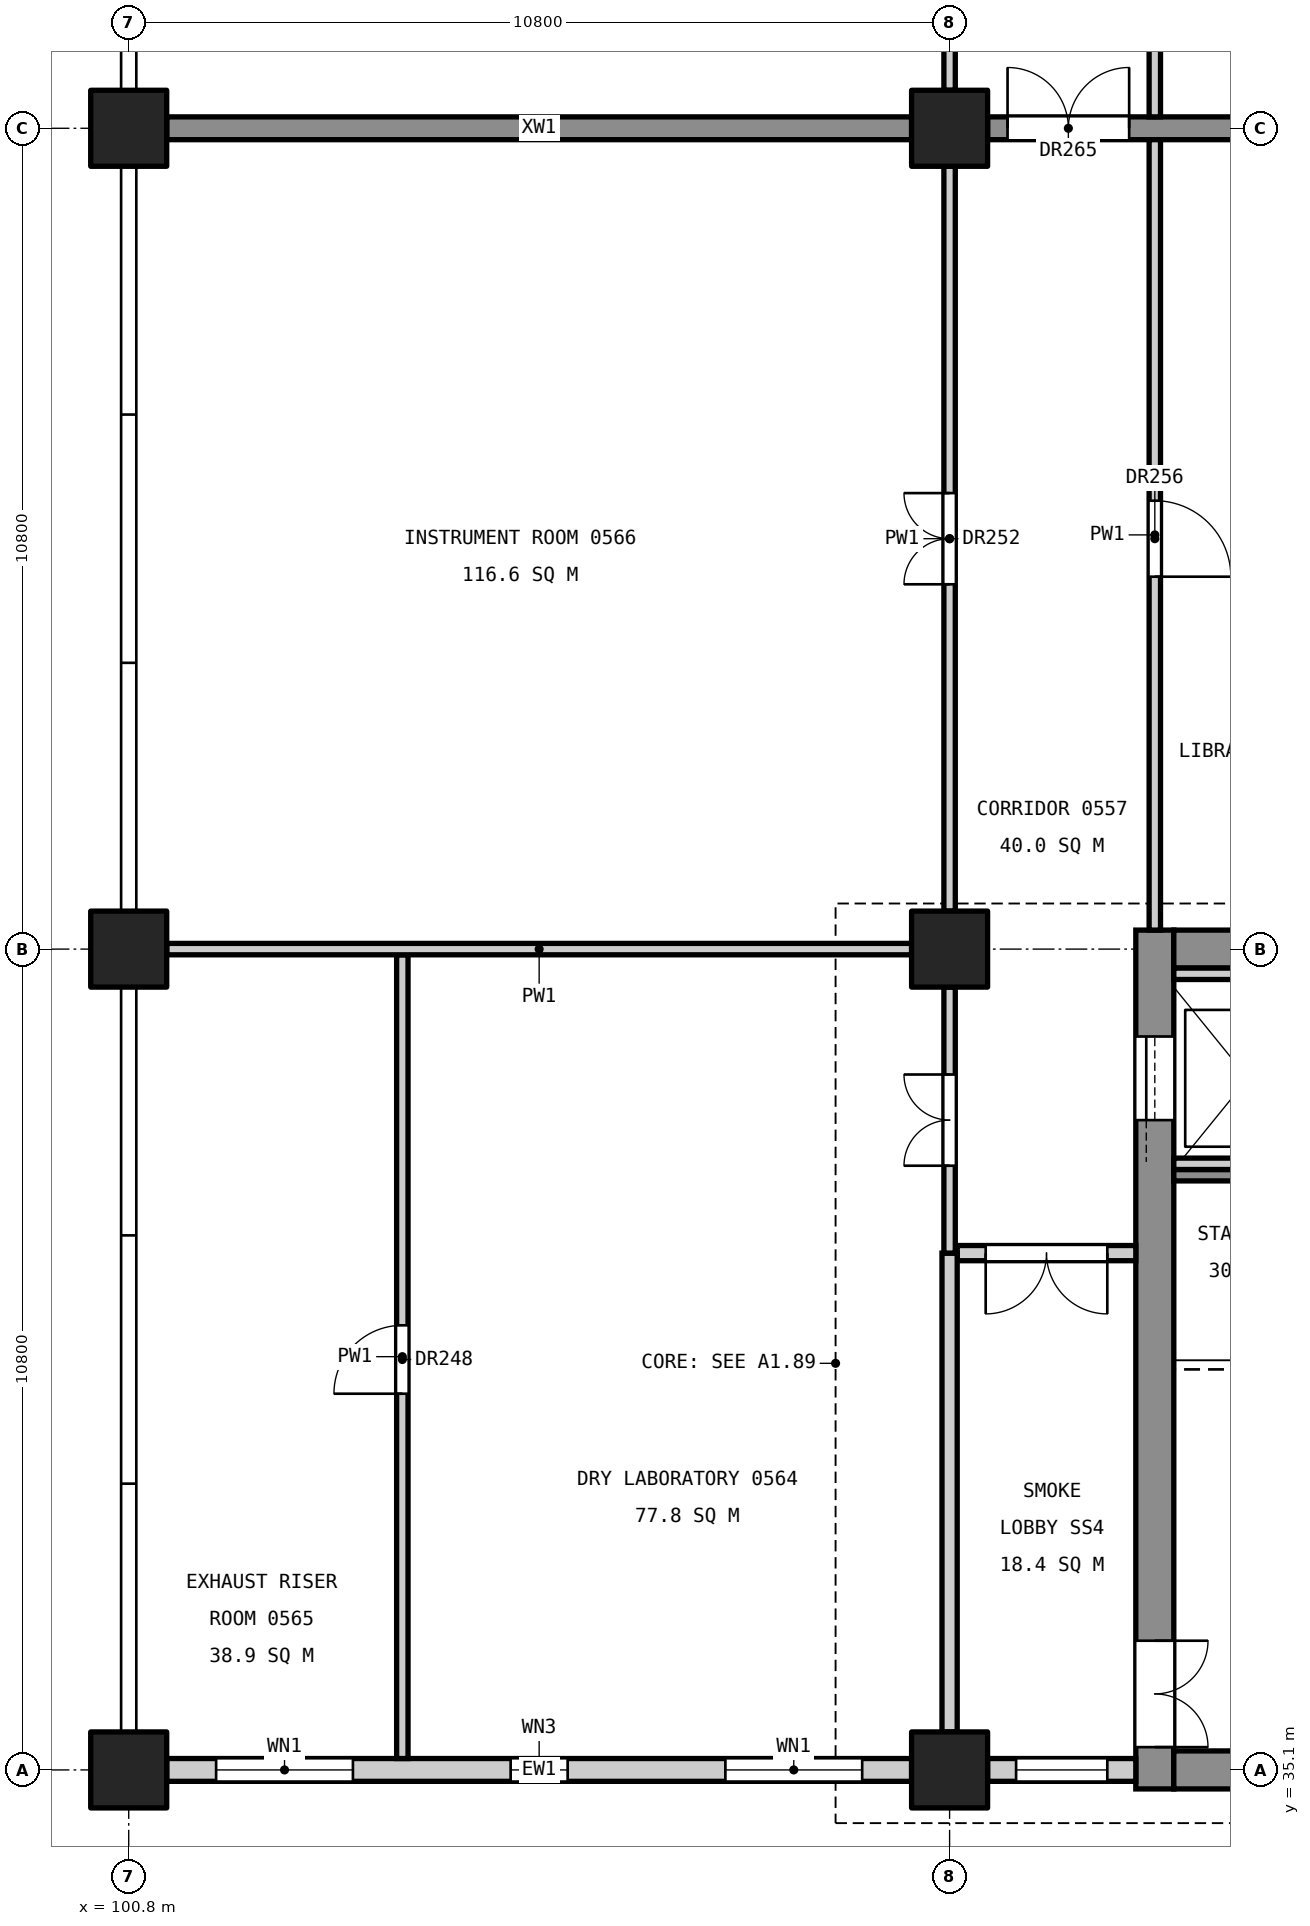
"""IFC4 building model, lengths in metres.
Left out: names, types, materials, properties, quantities, classifications, styles, units other than length and angle.
Written with IfcOpenShell. Run it as: python <this file> out.ifc"""

import sys

from ifc_helpers import new_model, si_unit, direction, frame, frame_2d, origin, origin_2d, place, context, subcontext, project, spatial, rectangle, extrude, element, fill, save


model = new_model("IFC4")
c1 = context("Model", 3, precision=1e-05, world=origin(), true_north=direction((0.0, 1.0)))
c2 = subcontext(c1, "Body", "Model", "MODEL_VIEW")
j1 = project(units=[si_unit("LENGTHUNIT", "METRE"), si_unit("PLANEANGLEUNIT", "RADIAN")], contexts=[c1])
p1 = place(None, origin())
s1 = spatial("IfcSite", under=j1, at=p1, CompositionType="ELEMENT")
p2 = place(p1, origin())
s2 = spatial("IfcBuilding", under=s1, at=p2, CompositionType="ELEMENT")
p3 = place(p2, frame((0.0, 0.0, 27.0)))
s3 = spatial("IfcBuildingStorey", under=s2, at=p3, CompositionType="ELEMENT", Elevation=27.0)
for number, where, z_axis, x_axis in (
    (1, (111.6, 35.1, 0.0), (0.0, 0.0, 1.0), (1.0, 0.0, 0.0)),
    (2, (111.6, 45.9, 0.0), (0.0, 0.0, 1.0), (1.0, 0.0, 0.0)),
    (3, (111.6, 56.7, 0.0), (0.0, 0.0, 1.0), (1.0, 0.0, 0.0)),
    (4, (100.8, 35.1, 0.0), (0.0, 0.0, 1.0), (1.0, 0.0, 0.0)),
    (5, (100.8, 45.9, 0.0), (0.0, 0.0, 1.0), (1.0, 0.0, 0.0)),
    (6, (100.8, 56.7, 0.0), (0.0, 0.0, 1.0), (1.0, 0.0, 0.0)),
):
    element("IfcColumn", number, at=place(p3, frame(where, z_axis=z_axis, x_axis=x_axis)), inside=s3, PredefinedType="COLUMN", context=c2, shape_type="SweptSolid", body=[
        extrude(rectangle(XDim=1.0, YDim=1.0, at=origin_2d()), origin(), (0.0, 0.0, 1.0), 4.8),
    ])
p4 = place(p3, frame((114.3, 34.85, 0.0), z_axis=(0.0, 0.0, 1.0), x_axis=(0.0, 1.0, 0.0)))
e7 = element("IfcWall", 7, at=p4, inside=s3, PredefinedType="SHEAR", context=c2, shape_type="SweptSolid", body=[
    extrude(rectangle(XDim=11.3, YDim=0.5, at=frame_2d((5.65, 0.0))), origin(), (0.0, 0.0, 1.0), 4.55),
])
p5 = place(p4, frame((0.55, 0.0, 0.0)))
e8 = element("IfcOpeningElement", 8, at=p5, cuts=e7, PredefinedType="OPENING", context=c2, shape_type="SweptSolid", body=[
    extrude(rectangle(XDim=1.4, YDim=2.1, at=frame_2d((0.7, 1.05))), frame((0.0, 0.26, 0.0), z_axis=(0.0, -1.0, 0.0), x_axis=(1.0, 0.0, 0.0)), (0.0, 0.0, 1.0), 0.52),
])
p6 = place(p4, frame((8.8, 0.0, 0.0)))
e9 = element("IfcOpeningElement", 9, at=p6, cuts=e7, PredefinedType="OPENING", context=c2, shape_type="SweptSolid", body=[
    extrude(rectangle(XDim=1.1, YDim=2.1, at=frame_2d((0.55, 1.05))), frame((0.0, 0.26, 0.0), z_axis=(0.0, -1.0, 0.0), x_axis=(1.0, 0.0, 0.0)), (0.0, 0.0, 1.0), 0.52),
])
p7 = place(p3, frame((118.55, 35.1, 0.0), z_axis=(0.0, 0.0, 1.0), x_axis=(-1.0, 0.0, 0.0)))
e10 = element("IfcWall", 10, at=p7, inside=s3, PredefinedType="SHEAR", context=c2, shape_type="SweptSolid", body=[
    extrude(rectangle(XDim=4.0, YDim=0.5, at=frame_2d((2.0, 0.0))), origin(), (0.0, 0.0, 1.0), 4.55),
])
p8 = place(p7, frame((1.4, 0.0, 3.4)))
e11 = element("IfcOpeningElement", 11, at=p8, cuts=e10, PredefinedType="OPENING", context=c2, shape_type="SweptSolid", body=[
    extrude(rectangle(XDim=1.2, YDim=0.9, at=frame_2d((0.6, 0.45))), frame((0.0, 0.26, 0.0), z_axis=(0.0, -1.0, 0.0), x_axis=(1.0, 0.0, 0.0)), (0.0, 0.0, 1.0), 0.52),
])
p9 = place(p3, frame((118.55, 45.9, 0.0), z_axis=(0.0, 0.0, 1.0), x_axis=(-1.0, 0.0, 0.0)))
e12 = element("IfcWall", 12, at=p9, inside=s3, PredefinedType="SHEAR", context=c2, shape_type="SweptSolid", body=[
    extrude(rectangle(XDim=4.0, YDim=0.5, at=frame_2d((2.0, 0.0))), origin(), (0.0, 0.0, 1.0), 4.55),
])
p10 = place(p3, frame((118.3, 56.7, 0.0), z_axis=(0.0, 0.0, 1.0), x_axis=(-1.0, 0.0, 0.0)))
e13 = element("IfcWall", 13, at=p10, inside=s3, PredefinedType="SHEAR", context=c2, shape_type="SweptSolid", body=[
    extrude(rectangle(XDim=6.2, YDim=0.3, at=frame_2d((3.1, 0.0))), origin(), (0.0, 0.0, 1.0), 4.55),
])
p11 = place(p10, frame((4.337, 0.0, 0.0)))
e14 = element("IfcOpeningElement", 14, at=p11, cuts=e13, PredefinedType="OPENING", context=c2, shape_type="SweptSolid", body=[
    extrude(rectangle(XDim=1.6, YDim=2.1, at=frame_2d((0.8, 1.05))), frame((0.0, 0.16, 0.0), z_axis=(0.0, -1.0, 0.0), x_axis=(1.0, 0.0, 0.0)), (0.0, 0.0, 1.0), 0.32),
])
p12 = place(p3, frame((111.1, 56.7, 0.0), z_axis=(0.0, 0.0, 1.0), x_axis=(-1.0, 0.0, 0.0)))
e15 = element("IfcWall", 15, at=p12, inside=s3, PredefinedType="SHEAR", context=c2, shape_type="SweptSolid", body=[
    extrude(rectangle(XDim=9.8, YDim=0.3, at=frame_2d((4.9, 0.0))), origin(), (0.0, 0.0, 1.0), 4.55),
])
p13 = place(p3, frame((118.55, 42.925, 0.0), z_axis=(0.0, 0.0, 1.0), x_axis=(-1.0, 0.0, 0.0)))
e16 = element("IfcWall", 16, at=p13, inside=s3, PredefinedType="SOLIDWALL", context=c2, shape_type="SweptSolid", body=[
    extrude(rectangle(XDim=4.0, YDim=0.15, at=frame_2d((2.0, 0.0))), origin(), (0.0, 0.0, 1.0), 4.55),
])
for number, where, z_axis, x_axis in (
    (17, (116.35, 43.075, 0.0), (0.0, 0.0, 1.0), (-1.0, 0.0, 0.0)),
    (18, (116.35, 45.575, 0.0), (0.0, 0.0, 1.0), (-1.0, 0.0, 0.0)),
):
    element("IfcWall", number, at=place(p3, frame(where, z_axis=z_axis, x_axis=x_axis)), inside=s3, PredefinedType="SOLIDWALL", context=c2, shape_type="SweptSolid", body=[
        extrude(rectangle(XDim=1.8, YDim=0.15, at=frame_2d((0.9, 0.0))), origin(), (0.0, 0.0, 1.0), 4.8),
    ])
p14 = place(p3, frame((114.05, 35.1, 0.0), z_axis=(0.0, 0.0, 1.0), x_axis=(-1.0, 0.0, 0.0)))
e19 = element("IfcWall", 19, at=p14, inside=s3, PredefinedType="STANDARD", context=c2, shape_type="SweptSolid", body=[
    extrude(rectangle(XDim=1.95, YDim=0.3, at=frame_2d((0.975, 0.0))), origin(), (0.0, 0.0, 1.0), 3.85),
])
p15 = place(p14, frame((0.375, 0.0, 0.9)))
e20 = element("IfcOpeningElement", 20, at=p15, cuts=e19, PredefinedType="OPENING", context=c2, shape_type="SweptSolid", body=[
    extrude(rectangle(XDim=1.2, YDim=2.4, at=frame_2d((0.6, 1.2))), frame((0.0, 0.16, 0.0), z_axis=(0.0, -1.0, 0.0), x_axis=(1.0, 0.0, 0.0)), (0.0, 0.0, 1.0), 0.32),
])
p16 = place(p3, frame((111.1, 35.1, 0.0), z_axis=(0.0, 0.0, 1.0), x_axis=(-1.0, 0.0, 0.0)))
e21 = element("IfcWall", 21, at=p16, inside=s3, PredefinedType="STANDARD", context=c2, shape_type="SweptSolid", body=[
    extrude(rectangle(XDim=9.8, YDim=0.3, at=frame_2d((4.9, 0.0))), origin(), (0.0, 0.0, 1.0), 3.85),
])
p17 = place(p16, frame((0.65, 0.0, 0.9)))
e22 = element("IfcOpeningElement", 22, at=p17, cuts=e21, PredefinedType="OPENING", context=c2, shape_type="SweptSolid", body=[
    extrude(rectangle(XDim=1.8, YDim=2.4, at=frame_2d((0.9, 1.2))), frame((0.0, 0.16, 0.0), z_axis=(0.0, -1.0, 0.0), x_axis=(1.0, 0.0, 0.0)), (0.0, 0.0, 1.0), 0.32),
])
p18 = place(p16, frame((4.525, 0.0, 0.8)))
e23 = element("IfcOpeningElement", 23, at=p18, cuts=e21, PredefinedType="OPENING", context=c2, shape_type="SweptSolid", body=[
    extrude(rectangle(XDim=0.75, YDim=1.2, at=frame_2d((0.375, 0.6))), frame((0.0, 0.16, 0.0), z_axis=(0.0, -1.0, 0.0), x_axis=(1.0, 0.0, 0.0)), (0.0, 0.0, 1.0), 0.32),
])
p19 = place(p16, frame((7.35, 0.0, 0.9)))
e24 = element("IfcOpeningElement", 24, at=p19, cuts=e21, PredefinedType="OPENING", context=c2, shape_type="SweptSolid", body=[
    extrude(rectangle(XDim=1.8, YDim=2.4, at=frame_2d((0.9, 1.2))), frame((0.0, 0.16, 0.0), z_axis=(0.0, -1.0, 0.0), x_axis=(1.0, 0.0, 0.0)), (0.0, 0.0, 1.0), 0.32),
])
p20 = place(p3, frame((114.3, 46.15, 0.0), z_axis=(0.0, 0.0, 1.0), x_axis=(0.0, 1.0, 0.0)))
e25 = element("IfcWall", 25, at=p20, inside=s3, PredefinedType="PARTITIONING", context=c2, shape_type="SweptSolid", body=[
    extrude(rectangle(XDim=10.4, YDim=0.15, at=frame_2d((5.2, 0.0))), origin(), (0.0, 0.0, 1.0), 3.55),
])
p21 = place(p20, frame((4.65, 0.0, 0.0)))
e26 = element("IfcOpeningElement", 26, at=p21, cuts=e25, PredefinedType="OPENING", context=c2, shape_type="SweptSolid", body=[
    extrude(rectangle(XDim=1.0, YDim=2.1, at=frame_2d((0.5, 1.05))), frame((0.0, 0.085, 0.0), z_axis=(0.0, -1.0, 0.0), x_axis=(1.0, 0.0, 0.0)), (0.0, 0.0, 1.0), 0.17),
])
p22 = place(p3, frame((114.3, 56.85, 0.0), z_axis=(0.0, 0.0, 1.0), x_axis=(0.0, 1.0, 0.0)))
e27 = element("IfcWall", 27, at=p22, inside=s3, PredefinedType="PARTITIONING", context=c2, shape_type="SweptSolid", body=[
    extrude(rectangle(XDim=3.2, YDim=0.15, at=frame_2d((1.6, 0.0))), origin(), (0.0, 0.0, 1.0), 3.55),
])
p23 = place(p22, frame((1.15, 0.0, 0.0)))
e28 = element("IfcOpeningElement", 28, at=p23, cuts=e27, PredefinedType="OPENING", context=c2, shape_type="SweptSolid", body=[
    extrude(rectangle(XDim=1.0, YDim=2.1, at=frame_2d((0.5, 1.05))), frame((0.0, 0.085, 0.0), z_axis=(0.0, -1.0, 0.0), x_axis=(1.0, 0.0, 0.0)), (0.0, 0.0, 1.0), 0.17),
])
p24 = place(p3, frame((114.05, 41.9, 0.0), z_axis=(0.0, 0.0, 1.0), x_axis=(-1.0, 0.0, 0.0)))
e29 = element("IfcWall", 29, at=p24, inside=s3, PredefinedType="PARTITIONING", context=c2, shape_type="SweptSolid", body=[
    extrude(rectangle(XDim=2.35, YDim=0.2, at=frame_2d((1.175, 0.0))), origin(), (0.0, 0.0, 1.0), 3.55),
])
p25 = place(p24, frame((0.375, 0.0, 0.0)))
e30 = element("IfcOpeningElement", 30, at=p25, cuts=e29, PredefinedType="OPENING", context=c2, shape_type="SweptSolid", body=[
    extrude(rectangle(XDim=1.6, YDim=2.1, at=frame_2d((0.8, 1.05))), frame((0.0, 0.11, 0.0), z_axis=(0.0, -1.0, 0.0), x_axis=(1.0, 0.0, 0.0)), (0.0, 0.0, 1.0), 0.22),
])
p26 = place(p3, frame((111.6, 35.6, 0.0), z_axis=(0.0, 0.0, 1.0), x_axis=(0.0, 1.0, 0.0)))
e31 = element("IfcWall", 31, at=p26, inside=s3, PredefinedType="PARTITIONING", context=c2, shape_type="SweptSolid", body=[
    extrude(rectangle(XDim=6.3, YDim=0.2, at=frame_2d((3.15, 0.0))), origin(), (0.0, 0.0, 1.0), 3.55),
])
p27 = place(p3, frame((111.6, 41.9, 0.0), z_axis=(0.0, 0.0, 1.0), x_axis=(0.0, 1.0, 0.0)))
e32 = element("IfcWall", 32, at=p27, inside=s3, PredefinedType="PARTITIONING", context=c2, shape_type="SweptSolid", body=[
    extrude(rectangle(XDim=3.5, YDim=0.15, at=frame_2d((1.75, 0.0))), origin(), (0.0, 0.0, 1.0), 3.55),
])
p28 = place(p27, frame((1.15, 0.0, 0.0)))
e33 = element("IfcOpeningElement", 33, at=p28, cuts=e32, PredefinedType="OPENING", context=c2, shape_type="SweptSolid", body=[
    extrude(rectangle(XDim=1.2, YDim=2.1, at=frame_2d((0.6, 1.05))), frame((0.0, 0.085, 0.0), z_axis=(0.0, -1.0, 0.0), x_axis=(1.0, 0.0, 0.0)), (0.0, 0.0, 1.0), 0.17),
])
p29 = place(p3, frame((111.6, 46.4, 0.0), z_axis=(0.0, 0.0, 1.0), x_axis=(0.0, 1.0, 0.0)))
e34 = element("IfcWall", 34, at=p29, inside=s3, PredefinedType="PARTITIONING", context=c2, shape_type="SweptSolid", body=[
    extrude(rectangle(XDim=9.8, YDim=0.15, at=frame_2d((4.9, 0.0))), origin(), (0.0, 0.0, 1.0), 3.55),
])
p30 = place(p29, frame((4.3, 0.0, 0.0)))
e35 = element("IfcOpeningElement", 35, at=p30, cuts=e34, PredefinedType="OPENING", context=c2, shape_type="SweptSolid", body=[
    extrude(rectangle(XDim=1.2, YDim=2.1, at=frame_2d((0.6, 1.05))), frame((0.0, 0.085, 0.0), z_axis=(0.0, -1.0, 0.0), x_axis=(1.0, 0.0, 0.0)), (0.0, 0.0, 1.0), 0.17),
])
p31 = place(p3, frame((111.6, 57.2, 0.0), z_axis=(0.0, 0.0, 1.0), x_axis=(0.0, 1.0, 0.0)))
e36 = element("IfcWall", 36, at=p31, inside=s3, PredefinedType="PARTITIONING", context=c2, shape_type="SweptSolid", body=[
    extrude(rectangle(XDim=3.1, YDim=0.15, at=frame_2d((1.55, 0.0))), origin(), (0.0, 0.0, 1.0), 3.55),
])
p32 = place(p3, frame((104.4, 35.25, 0.0), z_axis=(0.0, 0.0, 1.0), x_axis=(0.0, 1.0, 0.0)))
e37 = element("IfcWall", 37, at=p32, inside=s3, PredefinedType="PARTITIONING", context=c2, shape_type="SweptSolid", body=[
    extrude(rectangle(XDim=10.575, YDim=0.15, at=frame_2d((5.288, 0.0))), origin(), (0.0, 0.0, 1.0), 3.55),
])
p33 = place(p32, frame((4.8, 0.0, 0.0)))
e38 = element("IfcOpeningElement", 38, at=p33, cuts=e37, PredefinedType="OPENING", context=c2, shape_type="SweptSolid", body=[
    extrude(rectangle(XDim=0.9, YDim=2.1, at=frame_2d((0.45, 1.05))), frame((0.0, 0.085, 0.0), z_axis=(0.0, -1.0, 0.0), x_axis=(1.0, 0.0, 0.0)), (0.0, 0.0, 1.0), 0.17),
])
p34 = place(p3, frame((111.1, 45.9, 0.0), z_axis=(0.0, 0.0, 1.0), x_axis=(-1.0, 0.0, 0.0)))
e39 = element("IfcWall", 39, at=p34, inside=s3, PredefinedType="PARTITIONING", context=c2, shape_type="SweptSolid", body=[
    extrude(rectangle(XDim=9.8, YDim=0.15, at=frame_2d((4.9, 0.0))), origin(), (0.0, 0.0, 1.0), 3.85),
])
p35 = place(p5, frame((1.4, 0.0, 0.0), z_axis=(0.0, 0.0, 1.0), x_axis=(-1.0, 0.0, 0.0)))
e40 = element("IfcDoor", 40, at=p35, inside=s3, OperationType="DOUBLE_DOOR_SINGLE_SWING", PredefinedType="DOOR", context=c2, shape_type="SweptSolid", body=[
    extrude(rectangle(XDim=1.4, YDim=2.1, at=frame_2d((0.7, 1.05))), frame((0.0, 0.025, 0.0), z_axis=(0.0, -1.0, 0.0), x_axis=(1.0, 0.0, 0.0)), (0.0, 0.0, 1.0), 0.05),
])
fill(e8, e40)
p36 = place(p6, origin())
e41 = element("IfcDoor", 41, at=p36, inside=s3, OperationType="SLIDING_TO_LEFT", PredefinedType="DOOR", context=c2, shape_type="SweptSolid", body=[
    extrude(rectangle(XDim=1.1, YDim=2.1, at=frame_2d((0.55, 1.05))), frame((0.0, 0.025, 0.0), z_axis=(0.0, -1.0, 0.0), x_axis=(1.0, 0.0, 0.0)), (0.0, 0.0, 1.0), 0.05),
])
fill(e9, e41)
p37 = place(p15, origin())
e42 = element("IfcWindow", 42, at=p37, inside=s3, PartitioningType="SINGLE_PANEL", PredefinedType="WINDOW", context=c2, shape_type="SweptSolid", body=[
    extrude(rectangle(XDim=1.2, YDim=2.4, at=frame_2d((0.6, 1.2))), frame((0.0, 0.03, 0.0), z_axis=(0.0, -1.0, 0.0), x_axis=(1.0, 0.0, 0.0)), (0.0, 0.0, 1.0), 0.06),
])
fill(e20, e42)
p38 = place(p17, origin())
e43 = element("IfcWindow", 43, at=p38, inside=s3, PartitioningType="SINGLE_PANEL", PredefinedType="WINDOW", context=c2, shape_type="SweptSolid", body=[
    extrude(rectangle(XDim=1.8, YDim=2.4, at=frame_2d((0.9, 1.2))), frame((0.0, 0.03, 0.0), z_axis=(0.0, -1.0, 0.0), x_axis=(1.0, 0.0, 0.0)), (0.0, 0.0, 1.0), 0.06),
])
fill(e22, e43)
p39 = place(p18, origin())
e44 = element("IfcWindow", 44, at=p39, inside=s3, PartitioningType="SINGLE_PANEL", PredefinedType="WINDOW", context=c2, shape_type="SweptSolid", body=[
    extrude(rectangle(XDim=0.75, YDim=1.2, at=frame_2d((0.375, 0.6))), frame((0.0, 0.03, 0.0), z_axis=(0.0, -1.0, 0.0), x_axis=(1.0, 0.0, 0.0)), (0.0, 0.0, 1.0), 0.06),
])
fill(e23, e44)
p40 = place(p19, origin())
e45 = element("IfcWindow", 45, at=p40, inside=s3, PartitioningType="SINGLE_PANEL", PredefinedType="WINDOW", context=c2, shape_type="SweptSolid", body=[
    extrude(rectangle(XDim=1.8, YDim=2.4, at=frame_2d((0.9, 1.2))), frame((0.0, 0.03, 0.0), z_axis=(0.0, -1.0, 0.0), x_axis=(1.0, 0.0, 0.0)), (0.0, 0.0, 1.0), 0.06),
])
fill(e24, e45)
p41 = place(p28, origin())
e46 = element("IfcDoor", 46, at=p41, inside=s3, OperationType="DOUBLE_DOOR_SINGLE_SWING", PredefinedType="DOOR", context=c2, shape_type="SweptSolid", body=[
    extrude(rectangle(XDim=1.2, YDim=2.1, at=frame_2d((0.6, 1.05))), frame((0.0, 0.025, 0.0), z_axis=(0.0, -1.0, 0.0), x_axis=(1.0, 0.0, 0.0)), (0.0, 0.0, 1.0), 0.05),
])
fill(e33, e46)
p42 = place(p33, origin())
e47 = element("IfcDoor", 47, at=p42, inside=s3, OperationType="SINGLE_SWING_LEFT", PredefinedType="DOOR", context=c2, shape_type="SweptSolid", body=[
    extrude(rectangle(XDim=0.9, YDim=2.1, at=frame_2d((0.45, 1.05))), frame((0.0, 0.025, 0.0), z_axis=(0.0, -1.0, 0.0), x_axis=(1.0, 0.0, 0.0)), (0.0, 0.0, 1.0), 0.05),
])
fill(e38, e47)
p43 = place(p30, origin())
e48 = element("IfcDoor", 48, at=p43, inside=s3, OperationType="DOUBLE_DOOR_SINGLE_SWING", PredefinedType="DOOR", context=c2, shape_type="SweptSolid", body=[
    extrude(rectangle(XDim=1.2, YDim=2.1, at=frame_2d((0.6, 1.05))), frame((0.0, 0.025, 0.0), z_axis=(0.0, -1.0, 0.0), x_axis=(1.0, 0.0, 0.0)), (0.0, 0.0, 1.0), 0.05),
])
fill(e35, e48)
p44 = place(p21, frame((1.0, 0.0, 0.0), z_axis=(0.0, 0.0, 1.0), x_axis=(-1.0, 0.0, 0.0)))
e49 = element("IfcDoor", 49, at=p44, inside=s3, OperationType="SINGLE_SWING_RIGHT", PredefinedType="DOOR", context=c2, shape_type="SweptSolid", body=[
    extrude(rectangle(XDim=1.0, YDim=2.1, at=frame_2d((0.5, 1.05))), frame((0.0, 0.025, 0.0), z_axis=(0.0, -1.0, 0.0), x_axis=(1.0, 0.0, 0.0)), (0.0, 0.0, 1.0), 0.05),
])
fill(e26, e49)
p45 = place(p25, origin())
e50 = element("IfcDoor", 50, at=p45, inside=s3, OperationType="DOUBLE_DOOR_SINGLE_SWING", PredefinedType="DOOR", context=c2, shape_type="SweptSolid", body=[
    extrude(rectangle(XDim=1.6, YDim=2.1, at=frame_2d((0.8, 1.05))), frame((0.0, 0.025, 0.0), z_axis=(0.0, -1.0, 0.0), x_axis=(1.0, 0.0, 0.0)), (0.0, 0.0, 1.0), 0.05),
])
fill(e30, e50)
p46 = place(p11, frame((1.6, 0.0, 0.0), z_axis=(0.0, 0.0, 1.0), x_axis=(-1.0, 0.0, 0.0)))
e51 = element("IfcDoor", 51, at=p46, inside=s3, OperationType="DOUBLE_DOOR_SINGLE_SWING", PredefinedType="DOOR", context=c2, shape_type="SweptSolid", body=[
    extrude(rectangle(XDim=1.6, YDim=2.1, at=frame_2d((0.8, 1.05))), frame((0.0, 0.025, 0.0), z_axis=(0.0, -1.0, 0.0), x_axis=(1.0, 0.0, 0.0)), (0.0, 0.0, 1.0), 0.05),
])
fill(e14, e51)
save(model, sys.argv[1])
